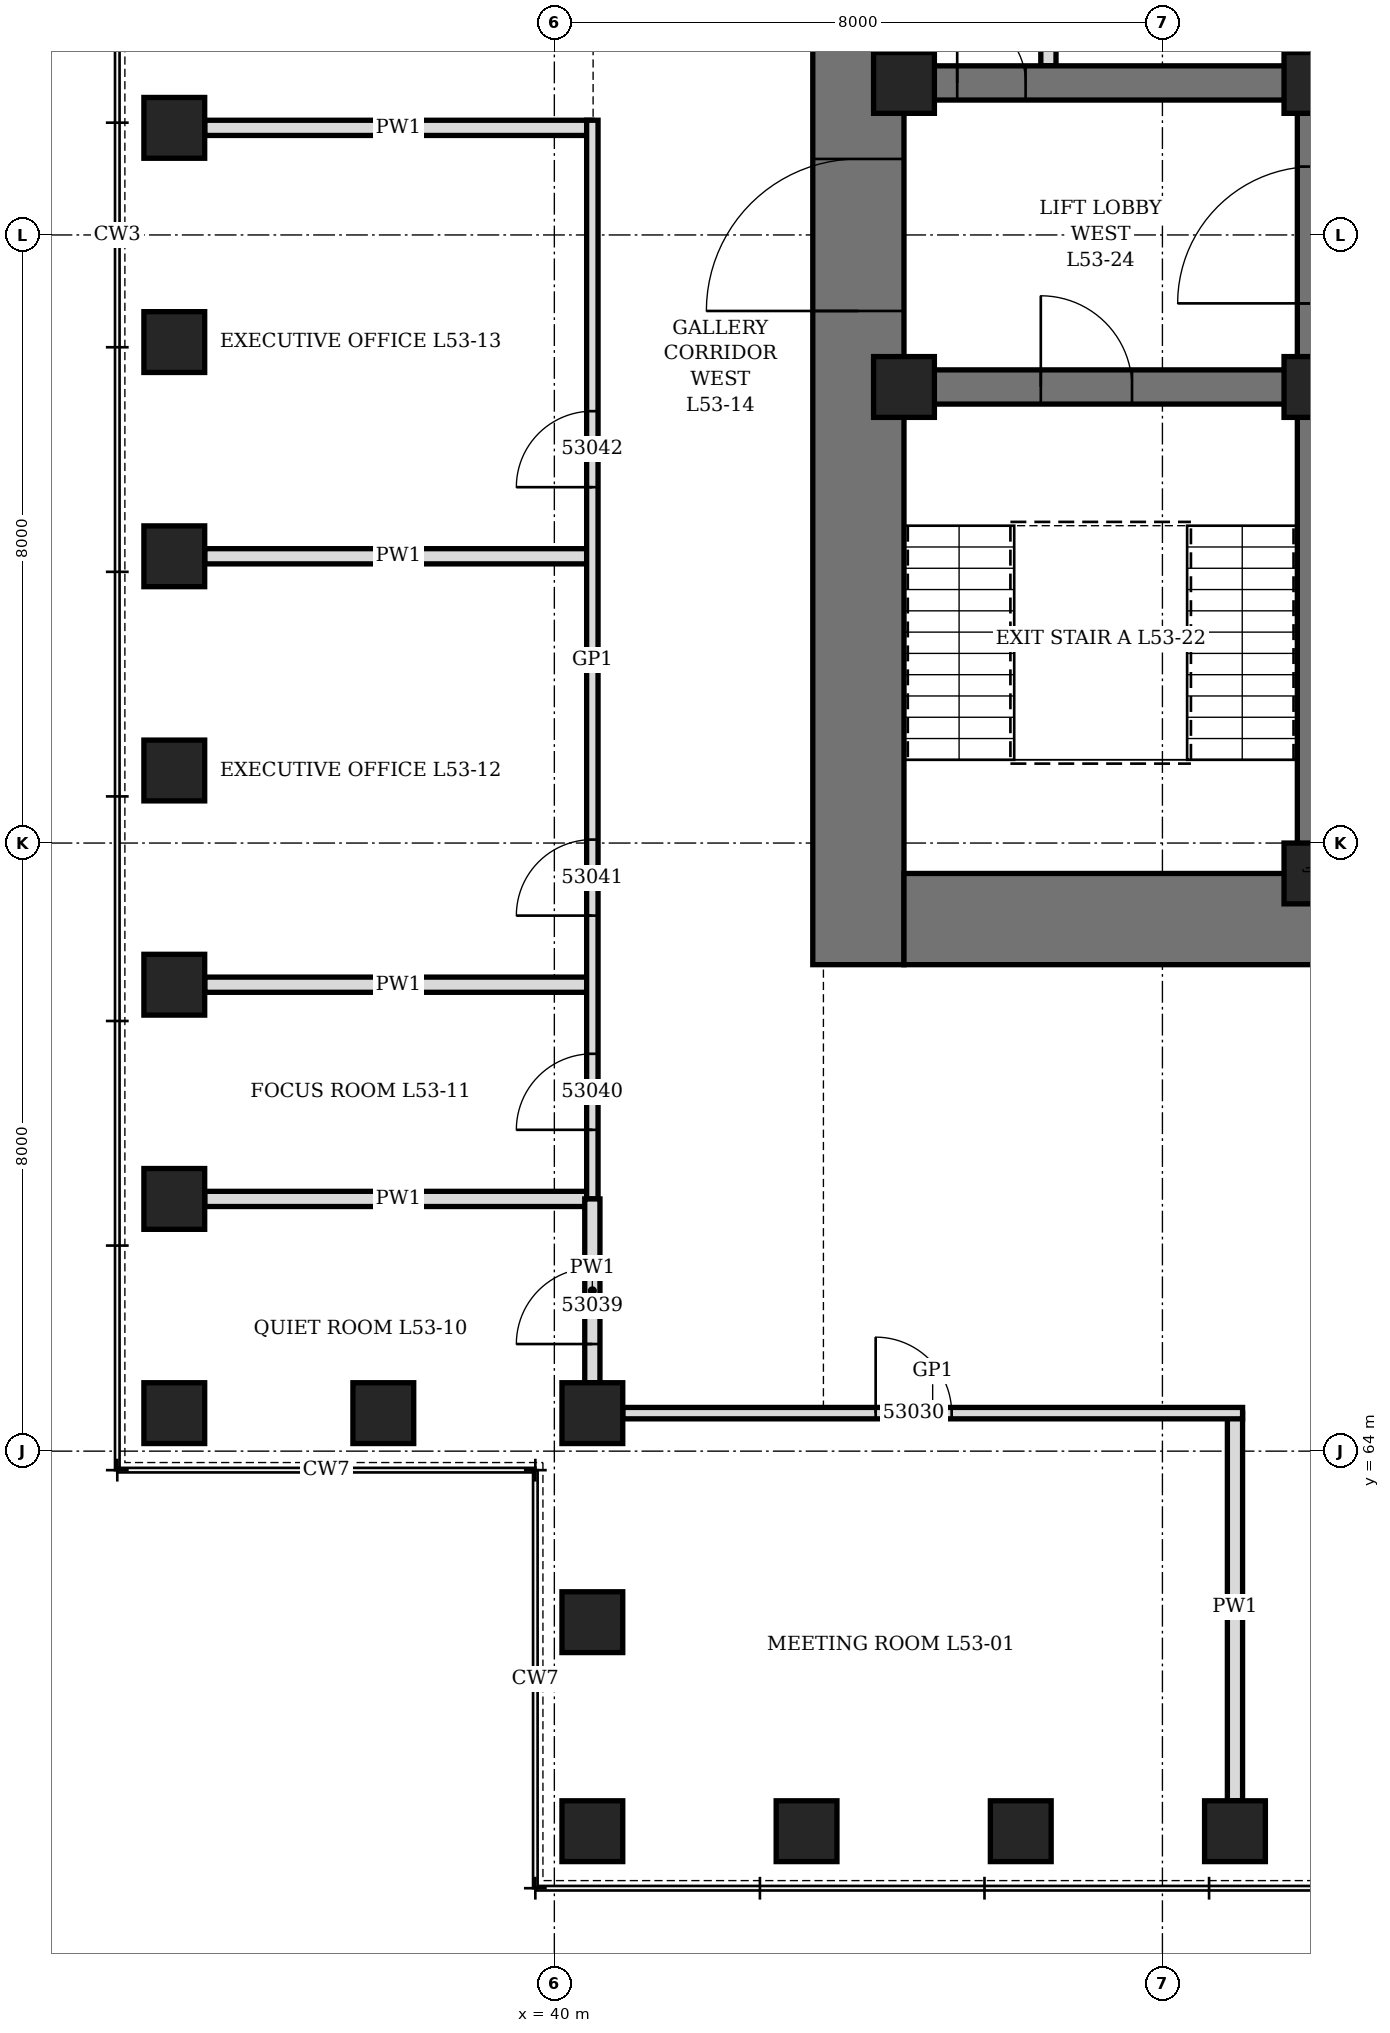
"""IFC4 building model, lengths in metres.
Left out: names, types, materials, properties, quantities, classifications, styles, units other than length and angle.
Written with IfcOpenShell. Run it as: python <this file> out.ifc"""

import sys

from ifc_helpers import new_model, si_unit, direction, frame, frame_2d, origin, origin_2d, place, context, subcontext, project, spatial, rectangle, hollow_rectangle, extrude, element, fill, save


model = new_model("IFC4")
c1 = context("Model", 3, precision=1e-05, world=origin(), true_north=direction((0.0, 1.0)))
c2 = subcontext(c1, "Body", "Model", "MODEL_VIEW")
j1 = project(units=[si_unit("LENGTHUNIT", "METRE"), si_unit("PLANEANGLEUNIT", "RADIAN")], contexts=[c1])
p1 = place(None, origin())
s1 = spatial("IfcSite", under=j1, at=p1, CompositionType="ELEMENT")
p2 = place(p1, origin())
s2 = spatial("IfcBuilding", under=s1, at=p2, CompositionType="ELEMENT")
p3 = place(p2, frame((0.0, 0.0, 235.9)))
s3 = spatial("IfcBuildingStorey", under=s2, at=p3, CompositionType="ELEMENT", Elevation=235.9)
for number, where, z_axis, x_axis in (
    (1, (40.5, 59.0, 0.0), (0.0, 0.0, 1.0), (1.0, 0.0, 0.0)),
    (2, (43.318, 59.0, 0.0), (0.0, 0.0, 1.0), (1.0, 0.0, 0.0)),
    (3, (46.136, 59.0, 0.0), (0.0, 0.0, 1.0), (1.0, 0.0, 0.0)),
    (4, (48.955, 59.0, 0.0), (0.0, 0.0, 1.0), (1.0, 0.0, 0.0)),
    (5, (35.0, 81.409, 0.0), (0.0, 0.0, 1.0), (0.0, 1.0, 0.0)),
    (6, (35.0, 78.591, 0.0), (0.0, 0.0, 1.0), (0.0, 1.0, 0.0)),
    (7, (35.0, 75.773, 0.0), (0.0, 0.0, 1.0), (0.0, 1.0, 0.0)),
    (8, (35.0, 72.955, 0.0), (0.0, 0.0, 1.0), (0.0, 1.0, 0.0)),
    (9, (35.0, 70.136, 0.0), (0.0, 0.0, 1.0), (0.0, 1.0, 0.0)),
    (10, (35.0, 67.318, 0.0), (0.0, 0.0, 1.0), (0.0, 1.0, 0.0)),
    (11, (35.0, 64.5, 0.0), (0.0, 0.0, 1.0), (1.0, 0.0, 0.0)),
    (12, (37.75, 64.5, 0.0), (0.0, 0.0, 1.0), (1.0, 0.0, 0.0)),
    (13, (40.5, 64.5, 0.0), (0.0, 0.0, 1.0), (0.0, 1.0, 0.0)),
    (14, (40.5, 61.75, 0.0), (0.0, 0.0, 1.0), (0.0, 1.0, 0.0)),
):
    element("IfcColumn", number, at=place(p3, frame(where, z_axis=z_axis, x_axis=x_axis)), inside=s3, PredefinedType="COLUMN", context=c2, shape_type="SweptSolid", body=[
        extrude(hollow_rectangle(XDim=0.8, YDim=0.8, WallThickness=0.08, at=origin_2d()), origin(), (0.0, 0.0, 1.0), 4.2),
    ])
p4 = place(p3, frame((44.0, 70.4, 0.0), z_axis=(0.0, 0.0, 1.0), x_axis=(0.0, 1.0, 0.0)))
e15 = element("IfcWall", 15, at=p4, inside=s3, PredefinedType="SHEAR", context=c2, shape_type="SweptSolid", body=[
    extrude(rectangle(XDim=19.2, YDim=1.2, at=frame_2d((9.6, 0.0))), origin(), (0.0, 0.0, 1.0), 4.2),
])
p5 = place(p4, frame((8.6, 0.0, 0.0)))
e16 = element("IfcOpeningElement", 16, at=p5, cuts=e15, PredefinedType="OPENING", context=c2, shape_type="SweptSolid", body=[
    extrude(rectangle(XDim=2.0, YDim=2.4, at=frame_2d((1.0, 1.2))), frame((0.0, 0.61, 0.0), z_axis=(0.0, -1.0, 0.0), x_axis=(1.0, 0.0, 0.0)), (0.0, 0.0, 1.0), 1.22),
])
p6 = place(p3, frame((44.6, 71.0, 0.0), z_axis=(0.0, 0.0, 1.0), x_axis=(1.0, 0.0, 0.0)))
e17 = element("IfcWall", 17, at=p6, inside=s3, PredefinedType="SHEAR", context=c2, shape_type="SweptSolid", body=[
    extrude(rectangle(XDim=22.8, YDim=1.2, at=frame_2d((11.4, 0.0))), origin(), (0.0, 0.0, 1.0), 4.2),
])
p7 = place(p6, frame((6.35, 0.0, 0.0)))
e18 = element("IfcOpeningElement", 18, at=p7, cuts=e17, PredefinedType="OPENING", context=c2, shape_type="SweptSolid", body=[
    extrude(rectangle(XDim=1.1, YDim=2.2, at=frame_2d((0.55, 1.1))), frame((0.0, 0.61, 0.0), z_axis=(0.0, -1.0, 0.0), x_axis=(1.0, 0.0, 0.0)), (0.0, 0.0, 1.0), 1.22),
])
p8 = place(p6, frame((9.35, 0.0, 0.0)))
e19 = element("IfcOpeningElement", 19, at=p8, cuts=e17, PredefinedType="OPENING", context=c2, shape_type="SweptSolid", body=[
    extrude(rectangle(XDim=1.1, YDim=2.2, at=frame_2d((0.55, 1.1))), frame((0.0, 0.61, 0.0), z_axis=(0.0, -1.0, 0.0), x_axis=(1.0, 0.0, 0.0)), (0.0, 0.0, 1.0), 1.22),
])
p9 = place(p6, frame((12.35, 0.0, 0.0)))
e20 = element("IfcOpeningElement", 20, at=p9, cuts=e17, PredefinedType="OPENING", context=c2, shape_type="SweptSolid", body=[
    extrude(rectangle(XDim=1.1, YDim=2.2, at=frame_2d((0.55, 1.1))), frame((0.0, 0.61, 0.0), z_axis=(0.0, -1.0, 0.0), x_axis=(1.0, 0.0, 0.0)), (0.0, 0.0, 1.0), 1.22),
])
p10 = place(p6, frame((15.35, 0.0, 0.0)))
e21 = element("IfcOpeningElement", 21, at=p10, cuts=e17, PredefinedType="OPENING", context=c2, shape_type="SweptSolid", body=[
    extrude(rectangle(XDim=1.1, YDim=2.2, at=frame_2d((0.55, 1.1))), frame((0.0, 0.61, 0.0), z_axis=(0.0, -1.0, 0.0), x_axis=(1.0, 0.0, 0.0)), (0.0, 0.0, 1.0), 1.22),
])
p11 = place(p3, frame((50.0, 71.6, 0.0), z_axis=(0.0, 0.0, 1.0), x_axis=(0.0, 1.0, 0.0)))
e22 = element("IfcWall", 22, at=p11, inside=s3, PredefinedType="SHEAR", context=c2, shape_type="SweptSolid", body=[
    extrude(rectangle(XDim=16.8, YDim=0.45, at=frame_2d((8.4, 0.0))), origin(), (0.0, 0.0, 1.0), 4.2),
])
p12 = place(p11, frame((7.5, 0.0, 0.0)))
e23 = element("IfcOpeningElement", 23, at=p12, cuts=e22, PredefinedType="OPENING", context=c2, shape_type="SweptSolid", body=[
    extrude(rectangle(XDim=1.8, YDim=2.4, at=frame_2d((0.9, 1.2))), frame((0.0, 0.235, 0.0), z_axis=(0.0, -1.0, 0.0), x_axis=(1.0, 0.0, 0.0)), (0.0, 0.0, 1.0), 0.47),
])
p13 = place(p3, frame((44.6, 78.0, 0.0), z_axis=(0.0, 0.0, 1.0), x_axis=(1.0, 0.0, 0.0)))
e24 = element("IfcWall", 24, at=p13, inside=s3, PredefinedType="SHEAR", context=c2, shape_type="SweptSolid", body=[
    extrude(rectangle(XDim=5.175, YDim=0.45, at=frame_2d((2.587, 0.0))), origin(), (0.0, 0.0, 1.0), 4.2),
])
p14 = place(p13, frame((1.8, 0.0, 0.0)))
e25 = element("IfcOpeningElement", 25, at=p14, cuts=e24, PredefinedType="OPENING", context=c2, shape_type="SweptSolid", body=[
    extrude(rectangle(XDim=1.2, YDim=2.1, at=frame_2d((0.6, 1.05))), frame((0.0, 0.235, 0.0), z_axis=(0.0, -1.0, 0.0), x_axis=(1.0, 0.0, 0.0)), (0.0, 0.0, 1.0), 0.47),
])
p15 = place(p3, frame((44.6, 82.0, 0.0), z_axis=(0.0, 0.0, 1.0), x_axis=(1.0, 0.0, 0.0)))
e26 = element("IfcWall", 26, at=p15, inside=s3, PredefinedType="SHEAR", context=c2, shape_type="SweptSolid", body=[
    extrude(rectangle(XDim=5.175, YDim=0.45, at=frame_2d((2.587, 0.0))), origin(), (0.0, 0.0, 1.0), 4.2),
])
p16 = place(p15, frame((0.7, 0.0, 0.0)))
e27 = element("IfcOpeningElement", 27, at=p16, cuts=e26, PredefinedType="OPENING", context=c2, shape_type="SweptSolid", body=[
    extrude(rectangle(XDim=0.9, YDim=2.1, at=frame_2d((0.45, 1.05))), frame((0.0, 0.235, 0.0), z_axis=(0.0, -1.0, 0.0), x_axis=(1.0, 0.0, 0.0)), (0.0, 0.0, 1.0), 0.47),
])
for number, where, z_axis, x_axis in (
    (28, (44.6, 78.0, 0.0), (0.0, 0.0, 1.0), (1.0, 0.0, 0.0)),
    (29, (44.6, 82.0, 0.0), (0.0, 0.0, 1.0), (1.0, 0.0, 0.0)),
    (30, (50.0, 71.6, 0.0), (0.0, 0.0, 1.0), (1.0, 0.0, 0.0)),
    (31, (50.0, 78.0, 0.0), (0.0, 0.0, 1.0), (1.0, 0.0, 0.0)),
    (32, (50.0, 82.0, 0.0), (0.0, 0.0, 1.0), (1.0, 0.0, 0.0)),
):
    element("IfcColumn", number, at=place(p3, frame(where, z_axis=z_axis, x_axis=x_axis)), inside=s3, PredefinedType="COLUMN", context=c2, shape_type="SweptSolid", body=[
        extrude(hollow_rectangle(XDim=0.8, YDim=0.8, WallThickness=0.1, at=origin_2d()), origin(), (0.0, 0.0, 1.0), 4.2),
    ])
p17 = place(p3, frame((46.5, 82.225, 0.0), z_axis=(0.0, 0.0, 1.0), x_axis=(0.0, 1.0, 0.0)))
e33 = element("IfcWall", 33, at=p17, inside=s3, PredefinedType="PARTITIONING", context=c2, shape_type="SweptSolid", body=[
    extrude(rectangle(XDim=3.05, YDim=0.2, at=frame_2d((1.525, 0.0))), origin(), (0.0, 0.0, 1.0), 4.04),
])
p18 = place(p17, frame((1.075, 0.0, 0.0)))
e34 = element("IfcOpeningElement", 34, at=p18, cuts=e33, PredefinedType="OPENING", context=c2, shape_type="SweptSolid", body=[
    extrude(rectangle(XDim=0.9, YDim=2.1, at=frame_2d((0.45, 1.05))), frame((0.0, 0.11, 0.0), z_axis=(0.0, -1.0, 0.0), x_axis=(1.0, 0.0, 0.0)), (0.0, 0.0, 1.0), 0.22),
])
for number, where, z_axis, x_axis in (
    (35, (48.955, 59.4, 0.0), (0.0, 0.0, 1.0), (0.0, 1.0, 0.0)),
    (36, (35.4, 67.318, 0.0), (0.0, 0.0, 1.0), (1.0, 0.0, 0.0)),
    (37, (35.4, 70.136, 0.0), (0.0, 0.0, 1.0), (1.0, 0.0, 0.0)),
    (38, (35.4, 75.773, 0.0), (0.0, 0.0, 1.0), (1.0, 0.0, 0.0)),
    (39, (35.4, 81.409, 0.0), (0.0, 0.0, 1.0), (1.0, 0.0, 0.0)),
):
    element("IfcWall", number, at=place(p3, frame(where, z_axis=z_axis, x_axis=x_axis)), inside=s3, PredefinedType="PARTITIONING", context=c2, shape_type="SweptSolid", body=[
        extrude(rectangle(XDim=5.1, YDim=0.2, at=frame_2d((2.55, 0.0))), origin(), (0.0, 0.0, 1.0), 3.428),
    ])
p19 = place(p3, frame((40.9, 64.5, 0.0), z_axis=(0.0, 0.0, 1.0), x_axis=(1.0, 0.0, 0.0)))
e40 = element("IfcWall", 40, at=p19, inside=s3, PredefinedType="PARTITIONING", context=c2, shape_type="SweptSolid", body=[
    extrude(rectangle(XDim=8.155, YDim=0.15, at=frame_2d((4.077, 0.0))), origin(), (0.0, 0.0, 1.0), 4.04),
])
p20 = place(p19, frame((3.327, 0.0, 0.0)))
e41 = element("IfcOpeningElement", 41, at=p20, cuts=e40, PredefinedType="OPENING", context=c2, shape_type="SweptSolid", body=[
    extrude(rectangle(XDim=1.0, YDim=2.4, at=frame_2d((0.5, 1.2))), frame((0.0, 0.085, 0.0), z_axis=(0.0, -1.0, 0.0), x_axis=(1.0, 0.0, 0.0)), (0.0, 0.0, 1.0), 0.17),
])
p21 = place(p3, frame((40.5, 67.318, 0.0), z_axis=(0.0, 0.0, 1.0), x_axis=(0.0, 1.0, 0.0)))
e42 = element("IfcWall", 42, at=p21, inside=s3, PredefinedType="PARTITIONING", context=c2, shape_type="SweptSolid", body=[
    extrude(rectangle(XDim=14.191, YDim=0.15, at=frame_2d((7.095, 0.0))), origin(), (0.0, 0.0, 1.0), 4.04),
])
p22 = place(p21, frame((0.909, 0.0, 0.0)))
e43 = element("IfcOpeningElement", 43, at=p22, cuts=e42, PredefinedType="OPENING", context=c2, shape_type="SweptSolid", body=[
    extrude(rectangle(XDim=1.0, YDim=2.4, at=frame_2d((0.5, 1.2))), frame((0.0, 0.085, 0.0), z_axis=(0.0, -1.0, 0.0), x_axis=(1.0, 0.0, 0.0)), (0.0, 0.0, 1.0), 0.17),
])
p23 = place(p21, frame((3.727, 0.0, 0.0)))
e44 = element("IfcOpeningElement", 44, at=p23, cuts=e42, PredefinedType="OPENING", context=c2, shape_type="SweptSolid", body=[
    extrude(rectangle(XDim=1.0, YDim=2.1, at=frame_2d((0.5, 1.05))), frame((0.0, 0.085, 0.0), z_axis=(0.0, -1.0, 0.0), x_axis=(1.0, 0.0, 0.0)), (0.0, 0.0, 1.0), 0.17),
])
p24 = place(p21, frame((9.364, 0.0, 0.0)))
e45 = element("IfcOpeningElement", 45, at=p24, cuts=e42, PredefinedType="OPENING", context=c2, shape_type="SweptSolid", body=[
    extrude(rectangle(XDim=1.0, YDim=2.1, at=frame_2d((0.5, 1.05))), frame((0.0, 0.085, 0.0), z_axis=(0.0, -1.0, 0.0), x_axis=(1.0, 0.0, 0.0)), (0.0, 0.0, 1.0), 0.17),
])
p25 = place(p3, frame((40.5, 64.9, 0.0), z_axis=(0.0, 0.0, 1.0), x_axis=(0.0, 1.0, 0.0)))
e46 = element("IfcWall", 46, at=p25, inside=s3, PredefinedType="PARTITIONING", context=c2, shape_type="SweptSolid", body=[
    extrude(rectangle(XDim=2.418, YDim=0.2, at=frame_2d((1.209, 0.0))), origin(), (0.0, 0.0, 1.0), 4.04),
])
p26 = place(p25, frame((0.509, 0.0, 0.0)))
e47 = element("IfcOpeningElement", 47, at=p26, cuts=e46, PredefinedType="OPENING", context=c2, shape_type="SweptSolid", body=[
    extrude(rectangle(XDim=1.0, YDim=2.1, at=frame_2d((0.5, 1.05))), frame((0.0, 0.11, 0.0), z_axis=(0.0, -1.0, 0.0), x_axis=(1.0, 0.0, 0.0)), (0.0, 0.0, 1.0), 0.22),
])
p27 = place(p16, origin())
e48 = element("IfcDoor", 48, at=p27, inside=s3, OperationType="SINGLE_SWING_LEFT", PredefinedType="DOOR", context=c2, shape_type="SweptSolid", body=[
    extrude(rectangle(XDim=0.9, YDim=2.1, at=frame_2d((0.45, 1.05))), frame((0.0, 0.225, 0.0), z_axis=(0.0, -1.0, 0.0), x_axis=(1.0, 0.0, 0.0)), (0.0, 0.0, 1.0), 0.449),
])
fill(e27, e48)
p28 = place(p14, origin())
e49 = element("IfcDoor", 49, at=p28, inside=s3, OperationType="SINGLE_SWING_LEFT", PredefinedType="DOOR", context=c2, shape_type="SweptSolid", body=[
    extrude(rectangle(XDim=1.2, YDim=2.1, at=frame_2d((0.6, 1.05))), frame((0.0, 0.225, 0.0), z_axis=(0.0, -1.0, 0.0), x_axis=(1.0, 0.0, 0.0)), (0.0, 0.0, 1.0), 0.449),
])
fill(e25, e49)
p29 = place(p5, origin())
e50 = element("IfcDoor", 50, at=p29, inside=s3, OperationType="DOUBLE_DOOR_SINGLE_SWING", PredefinedType="DOOR", context=c2, shape_type="SweptSolid", body=[
    extrude(rectangle(XDim=2.0, YDim=2.4, at=frame_2d((1.0, 1.2))), frame((0.0, 0.35, 0.0), z_axis=(0.0, -1.0, 0.0), x_axis=(1.0, 0.0, 0.0)), (0.0, 0.0, 1.0), 0.7),
])
fill(e16, e50)
p30 = place(p12, origin())
e51 = element("IfcDoor", 51, at=p30, inside=s3, OperationType="DOUBLE_DOOR_SINGLE_SWING", PredefinedType="DOOR", context=c2, shape_type="SweptSolid", body=[
    extrude(rectangle(XDim=1.8, YDim=2.4, at=frame_2d((0.9, 1.2))), frame((0.0, 0.225, 0.0), z_axis=(0.0, -1.0, 0.0), x_axis=(1.0, 0.0, 0.0)), (0.0, 0.0, 1.0), 0.449),
])
fill(e23, e51)
p31 = place(p20, origin())
e52 = element("IfcDoor", 52, at=p31, inside=s3, OperationType="SINGLE_SWING_RIGHT", PredefinedType="DOOR", context=c2, shape_type="SweptSolid", body=[
    extrude(rectangle(XDim=1.0, YDim=2.4, at=frame_2d((0.5, 1.2))), frame((0.0, 0.075, 0.0), z_axis=(0.0, -1.0, 0.0), x_axis=(1.0, 0.0, 0.0)), (0.0, 0.0, 1.0), 0.149),
])
fill(e41, e52)
p32 = place(p26, origin())
e53 = element("IfcDoor", 53, at=p32, inside=s3, OperationType="SINGLE_SWING_LEFT", PredefinedType="DOOR", context=c2, shape_type="SweptSolid", body=[
    extrude(rectangle(XDim=1.0, YDim=2.1, at=frame_2d((0.5, 1.05))), frame((0.0, 0.1, 0.0), z_axis=(0.0, -1.0, 0.0), x_axis=(1.0, 0.0, 0.0)), (0.0, 0.0, 1.0), 0.199),
])
fill(e47, e53)
p33 = place(p22, origin())
e54 = element("IfcDoor", 54, at=p33, inside=s3, OperationType="SINGLE_SWING_RIGHT", PredefinedType="DOOR", context=c2, shape_type="SweptSolid", body=[
    extrude(rectangle(XDim=1.0, YDim=2.4, at=frame_2d((0.5, 1.2))), frame((0.0, 0.075, 0.0), z_axis=(0.0, -1.0, 0.0), x_axis=(1.0, 0.0, 0.0)), (0.0, 0.0, 1.0), 0.149),
])
fill(e43, e54)
p34 = place(p23, origin())
e55 = element("IfcDoor", 55, at=p34, inside=s3, OperationType="SINGLE_SWING_LEFT", PredefinedType="DOOR", context=c2, shape_type="SweptSolid", body=[
    extrude(rectangle(XDim=1.0, YDim=2.1, at=frame_2d((0.5, 1.05))), frame((0.0, 0.075, 0.0), z_axis=(0.0, -1.0, 0.0), x_axis=(1.0, 0.0, 0.0)), (0.0, 0.0, 1.0), 0.149),
])
fill(e44, e55)
p35 = place(p24, origin())
e56 = element("IfcDoor", 56, at=p35, inside=s3, OperationType="SINGLE_SWING_LEFT", PredefinedType="DOOR", context=c2, shape_type="SweptSolid", body=[
    extrude(rectangle(XDim=1.0, YDim=2.1, at=frame_2d((0.5, 1.05))), frame((0.0, 0.075, 0.0), z_axis=(0.0, -1.0, 0.0), x_axis=(1.0, 0.0, 0.0)), (0.0, 0.0, 1.0), 0.149),
])
fill(e45, e56)
save(model, sys.argv[1])
